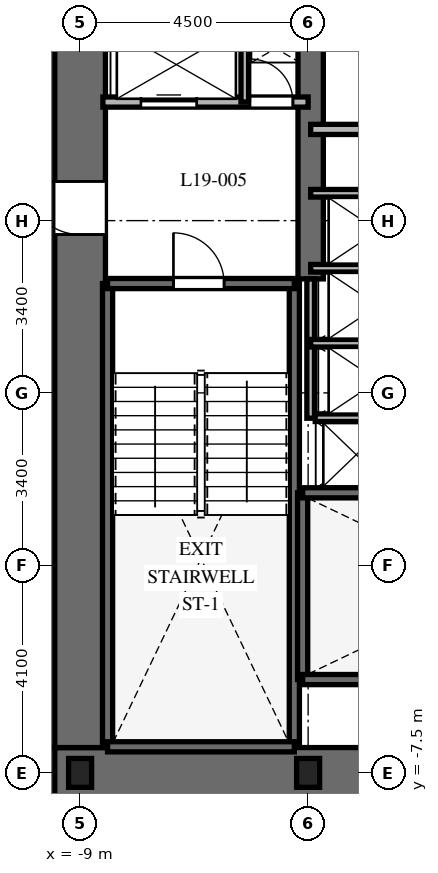
"""IFC4 building model, lengths in metres.
Left out: names, types, materials, properties, quantities, classifications, styles, units other than length and angle.
Written with IfcOpenShell. Run it as: python <this file> out.ifc"""

import sys

from ifc_helpers import new_model, si_unit, direction, frame, frame_2d, origin, origin_2d, place, context, subcontext, project, spatial, rectangle, i_section, extrude, element, fill, save


model = new_model("IFC4")
c1 = context("Model", 3, precision=1e-05, world=origin(), true_north=direction((0.0, 1.0)))
c2 = subcontext(c1, "Body", "Model", "MODEL_VIEW")
j1 = project(units=[si_unit("LENGTHUNIT", "METRE"), si_unit("PLANEANGLEUNIT", "RADIAN")], contexts=[c1])
p1 = place(None, origin())
s1 = spatial("IfcSite", under=j1, at=p1, CompositionType="ELEMENT")
p2 = place(p1, origin())
s2 = spatial("IfcBuilding", under=s1, at=p2, CompositionType="ELEMENT")
p3 = place(p2, frame((0.0, 0.0, 82.3)))
s3 = spatial("IfcBuildingStorey", under=s2, at=p3, CompositionType="ELEMENT", Elevation=82.3)
p4 = place(p3, frame((-9.5, -7.5, 0.0), z_axis=(0.0, 0.0, 1.0), x_axis=(1.0, 0.0, 0.0)))
e1 = element("IfcWall", 1, at=p4, inside=s3, PredefinedType="SHEAR", context=c2, shape_type="SweptSolid", body=[
    extrude(rectangle(XDim=19.0, YDim=1.0, at=frame_2d((9.5, 0.0))), origin(), (0.0, 0.0, 1.0), 3.7),
])
p5 = place(p4, frame((9.55, 0.0, 0.0)))
e2 = element("IfcOpeningElement", 2, at=p5, cuts=e1, PredefinedType="OPENING", context=c2, shape_type="SweptSolid", body=[
    extrude(rectangle(XDim=1.0, YDim=2.15, at=frame_2d((0.5, 1.075))), frame((0.0, 0.51, 0.0), z_axis=(0.0, -1.0, 0.0), x_axis=(1.0, 0.0, 0.0)), (0.0, 0.0, 1.0), 1.02),
])
p6 = place(p3, frame((-9.0, -7.0, 0.0), z_axis=(0.0, 0.0, 1.0), x_axis=(0.0, 1.0, 0.0)))
e3 = element("IfcWall", 3, at=p6, inside=s3, PredefinedType="SHEAR", context=c2, shape_type="SweptSolid", body=[
    extrude(rectangle(XDim=14.0, YDim=1.0, at=frame_2d((7.0, 0.0))), origin(), (0.0, 0.0, 1.0), 3.7),
])
p7 = place(p6, frame((10.125, 0.0, 0.0)))
e4 = element("IfcOpeningElement", 4, at=p7, cuts=e3, PredefinedType="OPENING", context=c2, shape_type="SweptSolid", body=[
    extrude(rectangle(XDim=1.05, YDim=2.15, at=frame_2d((0.525, 1.075))), frame((0.0, 0.51, 0.0), z_axis=(0.0, -1.0, 0.0), x_axis=(1.0, 0.0, 0.0)), (0.0, 0.0, 1.0), 1.02),
])
p8 = place(p3, frame((-4.45, 2.25, 0.0), z_axis=(0.0, 0.0, 1.0), x_axis=(0.0, 1.0, 0.0)))
e5 = element("IfcWall", 5, at=p8, inside=s3, PredefinedType="SHEAR", context=c2, shape_type="SweptSolid", body=[
    extrude(rectangle(XDim=4.75, YDim=0.5, at=frame_2d((2.375, 0.0))), origin(), (0.0, 0.0, 1.0), 3.7),
])
for number, where, z_axis, x_axis in (
    (6, (-8.458, -6.985, 0.0), (0.0, 0.0, 1.0), (0.0, 1.0, 0.0)),
    (7, (-4.772, -6.985, 0.0), (0.0, 0.0, 1.0), (0.0, 1.0, 0.0)),
):
    element("IfcWall", number, at=place(p3, frame(where, z_axis=z_axis, x_axis=x_axis)), inside=s3, PredefinedType="SHEAR", context=c2, shape_type="SweptSolid", body=[
        extrude(rectangle(XDim=9.143, YDim=0.2, at=frame_2d((4.572, 0.0))), origin(), (0.0, 0.0, 1.0), 3.7),
    ])
p9 = place(p3, frame((-8.458, -6.985, 0.0), z_axis=(0.0, 0.0, 1.0), x_axis=(1.0, 0.0, 0.0)))
e8 = element("IfcWall", 8, at=p9, inside=s3, PredefinedType="SHEAR", context=c2, shape_type="SweptSolid", body=[
    extrude(rectangle(XDim=3.686, YDim=0.2, at=frame_2d((1.843, 0.0))), origin(), (0.0, 0.0, 1.0), 3.7),
])
p10 = place(p3, frame((-8.458, 2.158, 0.0), z_axis=(0.0, 0.0, 1.0), x_axis=(1.0, 0.0, 0.0)))
e9 = element("IfcWall", 9, at=p10, inside=s3, PredefinedType="SHEAR", context=c2, shape_type="SweptSolid", body=[
    extrude(rectangle(XDim=3.686, YDim=0.2, at=frame_2d((1.843, 0.0))), origin(), (0.0, 0.0, 1.0), 3.7),
])
p11 = place(p10, frame((1.3, 0.0, 0.0)))
e10 = element("IfcOpeningElement", 10, at=p11, cuts=e9, PredefinedType="OPENING", context=c2, shape_type="SweptSolid", body=[
    extrude(rectangle(XDim=1.0, YDim=2.15, at=frame_2d((0.5, 1.075))), frame((0.0, 0.11, 0.0), z_axis=(0.0, -1.0, 0.0), x_axis=(1.0, 0.0, 0.0)), (0.0, 0.0, 1.0), 0.22),
])
p12 = place(p3, frame((-4.608, -5.658, 0.0), z_axis=(0.0, 0.0, 1.0), x_axis=(0.0, 1.0, 0.0)))
e11 = element("IfcWall", 11, at=p12, inside=s3, PredefinedType="SHEAR", context=c2, shape_type="SweptSolid", body=[
    extrude(rectangle(XDim=3.686, YDim=0.2, at=frame_2d((1.843, 0.0))), origin(), (0.0, 0.0, 1.0), 3.7),
])
p13 = place(p3, frame((-4.608, -5.658, 0.0), z_axis=(0.0, 0.0, 1.0), x_axis=(1.0, 0.0, 0.0)))
e12 = element("IfcWall", 12, at=p13, inside=s3, PredefinedType="SHEAR", context=c2, shape_type="SweptSolid", body=[
    extrude(rectangle(XDim=9.166, YDim=0.2, at=frame_2d((4.583, 0.0))), origin(), (0.0, 0.0, 1.0), 3.7),
])
p14 = place(p13, frame((7.45, 0.0, 0.0)))
e13 = element("IfcOpeningElement", 13, at=p14, cuts=e12, PredefinedType="OPENING", context=c2, shape_type="SweptSolid", body=[
    extrude(rectangle(XDim=1.0, YDim=2.15, at=frame_2d((0.5, 1.075))), frame((0.0, 0.11, 0.0), z_axis=(0.0, -1.0, 0.0), x_axis=(1.0, 0.0, 0.0)), (0.0, 0.0, 1.0), 0.22),
])
p15 = place(p3, frame((-4.608, -1.972, 0.0), z_axis=(0.0, 0.0, 1.0), x_axis=(1.0, 0.0, 0.0)))
e14 = element("IfcWall", 14, at=p15, inside=s3, PredefinedType="SHEAR", context=c2, shape_type="SweptSolid", body=[
    extrude(rectangle(XDim=9.166, YDim=0.2, at=frame_2d((4.583, 0.0))), origin(), (0.0, 0.0, 1.0), 3.7),
])
for number, where, z_axis, x_axis in (
    (15, (-9.0, -7.5, 0.0), (0.0, 0.0, 1.0), (1.0, 0.0, 0.0)),
    (16, (-4.5, -7.5, 0.0), (0.0, 0.0, 1.0), (1.0, 0.0, 0.0)),
):
    element("IfcColumn", number, at=place(p3, frame(where, z_axis=z_axis, x_axis=x_axis)), inside=s3, PredefinedType="COLUMN", context=c2, shape_type="SweptSolid", body=[
        extrude(i_section(OverallWidth=0.454, OverallDepth=0.569, WebThickness=0.078, FlangeThickness=0.125, at=origin_2d()), origin(), (0.0, 0.0, 1.0), 3.7),
    ])
p16 = place(p3, frame((-8.55, 5.74, 0.0), z_axis=(0.0, 0.0, 1.0), x_axis=(1.0, 0.0, 0.0)))
e17 = element("IfcWall", 17, at=p16, inside=s3, PredefinedType="PARTITIONING", context=c2, shape_type="SweptSolid", body=[
    extrude(rectangle(XDim=4.05, YDim=0.2, at=frame_2d((2.025, 0.0))), origin(), (0.0, 0.0, 1.0), 3.38),
])
p17 = place(p16, frame((0.75, 0.0, 0.0)))
e18 = element("IfcOpeningElement", 18, at=p17, cuts=e17, PredefinedType="OPENING", context=c2, shape_type="SweptSolid", body=[
    extrude(rectangle(XDim=1.1, YDim=2.2, at=frame_2d((0.55, 1.1))), frame((0.0, 0.11, 0.0), z_axis=(0.0, -1.0, 0.0), x_axis=(1.0, 0.0, 0.0)), (0.0, 0.0, 1.0), 0.22),
])
p18 = place(p16, frame((2.9, 0.0, 0.0)))
e19 = element("IfcOpeningElement", 19, at=p18, cuts=e17, PredefinedType="OPENING", context=c2, shape_type="SweptSolid", body=[
    extrude(rectangle(XDim=0.85, YDim=2.03, at=frame_2d((0.425, 1.015))), frame((0.0, 0.11, 0.0), z_axis=(0.0, -1.0, 0.0), x_axis=(1.0, 0.0, 0.0)), (0.0, 0.0, 1.0), 0.22),
])
p19 = place(p3, frame((-5.75, 5.74, 0.0), z_axis=(0.0, 0.0, 1.0), x_axis=(0.0, 1.0, 0.0)))
e20 = element("IfcWall", 20, at=p19, inside=s3, PredefinedType="PARTITIONING", context=c2, shape_type="SweptSolid", body=[
    extrude(rectangle(XDim=1.41, YDim=0.15, at=frame_2d((0.705, 0.0))), origin(), (0.0, 0.0, 1.0), 3.38),
])
p20 = place(p3, frame((-4.45, 5.2, 0.0), z_axis=(0.0, 0.0, 1.0), x_axis=(1.0, 0.0, 0.0)))
e21 = element("IfcWall", 21, at=p20, inside=s3, PredefinedType="PARTITIONING", context=c2, shape_type="SweptSolid", body=[
    extrude(rectangle(XDim=4.5, YDim=0.2, at=frame_2d((2.25, 0.0))), origin(), (0.0, 0.0, 1.0), 3.38),
])
p21 = place(p3, frame((-4.45, -0.5, 0.0), z_axis=(0.0, 0.0, 1.0), x_axis=(0.0, 1.0, 0.0)))
e22 = element("IfcWall", 22, at=p21, inside=s3, PredefinedType="PARTITIONING", context=c2, shape_type="SweptSolid", body=[
    extrude(rectangle(XDim=2.75, YDim=0.15, at=frame_2d((1.375, 0.0))), origin(), (0.0, 0.0, 1.0), 3.38),
])
for number, where, z_axis, x_axis in (
    (23, (-4.45, 3.94, 0.0), (0.0, 0.0, 1.0), (1.0, 0.0, 0.0)),
    (24, (-4.45, 0.98, 0.0), (0.0, 0.0, 1.0), (1.0, 0.0, 0.0)),
    (25, (-4.45, 2.46, 0.0), (0.0, 0.0, 1.0), (1.0, 0.0, 0.0)),
):
    element("IfcWall", number, at=place(p3, frame(where, z_axis=z_axis, x_axis=x_axis)), inside=s3, PredefinedType="PARTITIONING", context=c2, shape_type="SweptSolid", body=[
        extrude(rectangle(XDim=2.55, YDim=0.15, at=frame_2d((1.275, 0.0))), origin(), (0.0, 0.0, 1.0), 3.38),
    ])
p22 = place(p3, frame((-4.36, -0.49, 0.0), z_axis=(0.0, 0.0, 1.0), x_axis=(1.0, 0.0, 0.0)))
e26 = element("IfcWall", 26, at=p22, inside=s3, PredefinedType="PARTITIONING", context=c2, shape_type="SweptSolid", body=[
    extrude(rectangle(XDim=8.72, YDim=0.15, at=frame_2d((4.36, 0.0))), origin(), (0.0, 0.0, 1.0), 3.38),
])
p23 = place(p22, frame((3.16, 0.0, 0.0)))
e27 = element("IfcOpeningElement", 27, at=p23, cuts=e26, PredefinedType="OPENING", context=c2, shape_type="SweptSolid", body=[
    extrude(rectangle(XDim=0.85, YDim=2.03, at=frame_2d((0.425, 1.015))), frame((0.0, 0.085, 0.0), z_axis=(0.0, -1.0, 0.0), x_axis=(1.0, 0.0, 0.0)), (0.0, 0.0, 1.0), 0.17),
])
p24 = place(p22, frame((5.21, 0.0, 0.0)))
e28 = element("IfcOpeningElement", 28, at=p24, cuts=e26, PredefinedType="OPENING", context=c2, shape_type="SweptSolid", body=[
    extrude(rectangle(XDim=0.85, YDim=2.03, at=frame_2d((0.425, 1.015))), frame((0.0, 0.085, 0.0), z_axis=(0.0, -1.0, 0.0), x_axis=(1.0, 0.0, 0.0)), (0.0, 0.0, 1.0), 0.17),
])
p25 = place(p11, origin())
e29 = element("IfcDoor", 29, at=p25, inside=s3, OperationType="SINGLE_SWING_LEFT", PredefinedType="DOOR", context=c2, shape_type="SweptSolid", body=[
    extrude(rectangle(XDim=1.0, YDim=2.15, at=frame_2d((0.5, 1.075))), frame((0.0, 0.025, 0.0), z_axis=(0.0, -1.0, 0.0), x_axis=(1.0, 0.0, 0.0)), (0.0, 0.0, 1.0), 0.05),
])
fill(e10, e29)
p26 = place(p7, origin())
e30 = element("IfcDoor", 30, at=p26, inside=s3, OperationType="SINGLE_SWING_RIGHT", PredefinedType="DOOR", context=c2, shape_type="SweptSolid", body=[
    extrude(rectangle(XDim=1.05, YDim=2.15, at=frame_2d((0.525, 1.075))), frame((0.0, 0.025, 0.0), z_axis=(0.0, -1.0, 0.0), x_axis=(1.0, 0.0, 0.0)), (0.0, 0.0, 1.0), 0.05),
])
fill(e4, e30)
p27 = place(p17, origin())
e31 = element("IfcDoor", 31, at=p27, inside=s3, OperationType="SLIDING_TO_LEFT", PredefinedType="DOOR", context=c2, shape_type="SweptSolid", body=[
    extrude(rectangle(XDim=1.1, YDim=2.2, at=frame_2d((0.55, 1.1))), frame((0.0, 0.025, 0.0), z_axis=(0.0, -1.0, 0.0), x_axis=(1.0, 0.0, 0.0)), (0.0, 0.0, 1.0), 0.05),
])
fill(e18, e31)
p28 = place(p18, origin())
e32 = element("IfcDoor", 32, at=p28, inside=s3, OperationType="SINGLE_SWING_LEFT", PredefinedType="DOOR", context=c2, shape_type="SweptSolid", body=[
    extrude(rectangle(XDim=0.85, YDim=2.03, at=frame_2d((0.425, 1.015))), frame((0.0, 0.025, 0.0), z_axis=(0.0, -1.0, 0.0), x_axis=(1.0, 0.0, 0.0)), (0.0, 0.0, 1.0), 0.05),
])
fill(e19, e32)
save(model, sys.argv[1])
